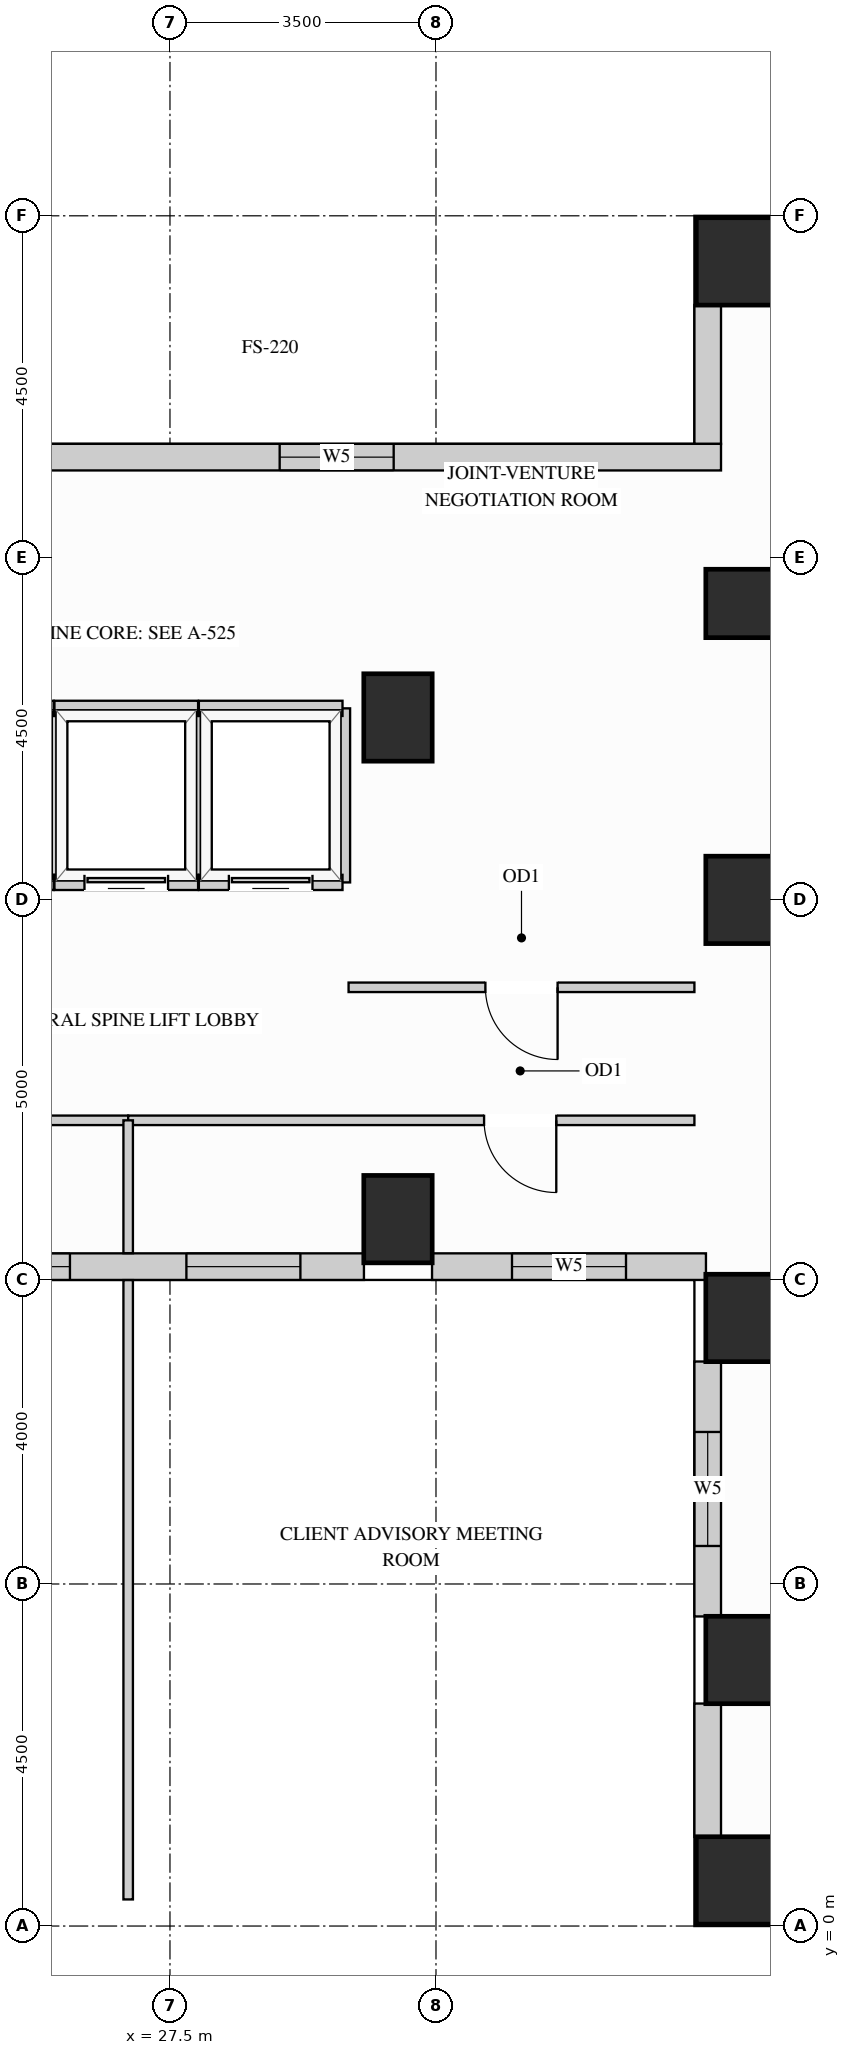
"""IFC4 building model, lengths in metres.
Left out: names, types, materials, properties, quantities, classifications, styles, units other than length and angle.
Written with IfcOpenShell. Run it as: python <this file> out.ifc"""

import sys

from ifc_helpers import new_model, si_unit, direction, frame, frame_2d, origin, origin_2d, place, context, subcontext, project, spatial, rectangle, extrude, source, transform, mapped, element, fill, save


model = new_model("IFC4")
c1 = context("Model", 3, precision=1e-05, world=origin(), true_north=direction((0.0, 1.0)))
c2 = subcontext(c1, "Body", "Model", "MODEL_VIEW")
j1 = project(units=[si_unit("LENGTHUNIT", "METRE"), si_unit("PLANEANGLEUNIT", "RADIAN")], contexts=[c1])
p1 = place(None, origin())
s1 = spatial("IfcSite", under=j1, at=p1, CompositionType="ELEMENT")
p2 = place(p1, origin())
s2 = spatial("IfcBuilding", under=s1, at=p2, CompositionType="ELEMENT")
p3 = place(p2, frame((0.0, 0.0, 99.0)))
s3 = spatial("IfcBuildingStorey", under=s2, at=p3, CompositionType="ELEMENT", Elevation=99.0)
m1 = source(origin(), c2, "Body", "SweptSolid", [
    extrude(rectangle(XDim=0.9, YDim=0.9, at=origin_2d()), origin(), (0.0, 0.0, 1.0), 3.38),
])
p4 = place(p3, frame((35.0, 17.4, 0.0), z_axis=(0.0, 0.0, 1.0), x_axis=(1.0, 0.0, 0.0)))
e1 = element("IfcColumn", 1, at=p4, inside=s3, PredefinedType="COLUMN", context=c2, shape_type="MappedRepresentation", body=[
    mapped(m1, transform((0.0, 0.0, 0.0), x_axis=(1.0, 0.0, 0.0), y_axis=(0.0, 1.0, 0.0), z_axis=(0.0, 0.0, 1.0))),
])
m2 = source(origin(), c2, "Body", "SweptSolid", [
    extrude(rectangle(XDim=0.9, YDim=1.15, at=origin_2d()), origin(), (0.0, 0.0, 1.0), 3.38),
])
for number, where, z_axis, x_axis in (
    (2, (35.0, 13.5, 0.0), (0.0, 0.0, 1.0), (1.0, 0.0, 0.0)),
    (3, (35.0, 3.5, 0.0), (0.0, 0.0, 1.0), (1.0, 0.0, 0.0)),
    (4, (35.0, 8.0, 0.0), (0.0, 0.0, 1.0), (1.0, 0.0, 0.0)),
    (5, (30.5, 15.9, 0.0), (0.0, 0.0, 1.0), (1.0, 0.0, 0.0)),
    (6, (30.5, 9.3, 0.0), (0.0, 0.0, 1.0), (1.0, 0.0, 0.0)),
):
    element("IfcColumn", number, at=place(p3, frame(where, z_axis=z_axis, x_axis=x_axis)), inside=s3, PredefinedType="COLUMN", context=c2, shape_type="MappedRepresentation", body=[
        mapped(m2, transform((0.0, 0.0, 0.0), x_axis=(1.0, 0.0, 0.0), y_axis=(0.0, 1.0, 0.0), z_axis=(0.0, 0.0, 1.0))),
    ])
m3 = source(origin(), c2, "Body", "SweptSolid", [
    extrude(rectangle(XDim=1.15, YDim=1.15, at=origin_2d()), origin(), (0.0, 0.0, 1.0), 3.38),
])
for number, where, z_axis, x_axis in (
    (7, (35.0, 21.9, 0.0), (0.0, 0.0, 1.0), (1.0, 0.0, 0.0)),
    (8, (35.0, 0.6, 0.0), (0.0, 0.0, 1.0), (1.0, 0.0, 0.0)),
):
    element("IfcColumn", number, at=place(p3, frame(where, z_axis=z_axis, x_axis=x_axis)), inside=s3, PredefinedType="COLUMN", context=c2, shape_type="MappedRepresentation", body=[
        mapped(m3, transform((0.0, 0.0, 0.0), x_axis=(1.0, 0.0, 0.0), y_axis=(0.0, 1.0, 0.0), z_axis=(0.0, 0.0, 1.0))),
    ])
p5 = place(p3, frame((23.848, 8.675, 0.0), z_axis=(0.0, 0.0, 1.0), x_axis=(1.0, 0.0, 0.0)))
e9 = element("IfcWall", 9, at=p5, inside=s3, PredefinedType="SOLIDWALL", context=c2, shape_type="SweptSolid", body=[
    extrude(rectangle(XDim=6.204, YDim=0.35, at=frame_2d((3.102, 0.0))), origin(), (0.0, 0.0, 1.0), 3.365),
])
p6 = place(p5, frame((0.836, 0.0, 0.78)))
e10 = element("IfcOpeningElement", 10, at=p6, cuts=e9, PredefinedType="OPENING", context=c2, shape_type="SweptSolid", body=[
    extrude(rectangle(XDim=1.5, YDim=2.0, at=frame_2d((0.75, 1.0))), frame((0.0, 0.185, 0.0), z_axis=(0.0, -1.0, 0.0), x_axis=(1.0, 0.0, 0.0)), (0.0, 0.0, 1.0), 0.37),
])
p7 = place(p5, frame((3.868, 0.0, 0.78)))
e11 = element("IfcOpeningElement", 11, at=p7, cuts=e9, PredefinedType="OPENING", context=c2, shape_type="SweptSolid", body=[
    extrude(rectangle(XDim=1.5, YDim=2.0, at=frame_2d((0.75, 1.0))), frame((0.0, 0.185, 0.0), z_axis=(0.0, -1.0, 0.0), x_axis=(1.0, 0.0, 0.0)), (0.0, 0.0, 1.0), 0.37),
])
p8 = place(p3, frame((30.948, 8.675, 0.0), z_axis=(0.0, 0.0, 1.0), x_axis=(1.0, 0.0, 0.0)))
e12 = element("IfcWall", 12, at=p8, inside=s3, PredefinedType="SOLIDWALL", context=c2, shape_type="SweptSolid", body=[
    extrude(rectangle(XDim=3.604, YDim=0.35, at=frame_2d((1.802, 0.0))), origin(), (0.0, 0.0, 1.0), 3.365),
])
p9 = place(p8, frame((1.052, 0.0, 0.78)))
e13 = element("IfcOpeningElement", 13, at=p9, cuts=e12, PredefinedType="OPENING", context=c2, shape_type="SweptSolid", body=[
    extrude(rectangle(XDim=1.5, YDim=2.0, at=frame_2d((0.75, 1.0))), frame((0.0, 0.185, 0.0), z_axis=(0.0, -1.0, 0.0), x_axis=(1.0, 0.0, 0.0)), (0.0, 0.0, 1.0), 0.37),
])
p10 = place(p3, frame((34.575, 7.427, 0.0), z_axis=(0.0, 0.0, 1.0), x_axis=(0.0, -1.0, 0.0)))
e14 = element("IfcWall", 14, at=p10, inside=s3, PredefinedType="SOLIDWALL", context=c2, shape_type="SweptSolid", body=[
    extrude(rectangle(XDim=3.354, YDim=0.35, at=frame_2d((1.677, 0.0))), origin(), (0.0, 0.0, 1.0), 3.365),
])
p11 = place(p10, frame((0.927, 0.0, 0.78)))
e15 = element("IfcOpeningElement", 15, at=p11, cuts=e14, PredefinedType="OPENING", context=c2, shape_type="SweptSolid", body=[
    extrude(rectangle(XDim=1.5, YDim=2.0, at=frame_2d((0.75, 1.0))), frame((0.0, 0.185, 0.0), z_axis=(0.0, -1.0, 0.0), x_axis=(1.0, 0.0, 0.0)), (0.0, 0.0, 1.0), 0.37),
])
m4 = source(origin(), c2, "Body", "SweptSolid", [
    extrude(rectangle(XDim=1.754, YDim=0.35, at=frame_2d((0.877, 0.0))), origin(), (0.0, 0.0, 1.0), 3.365),
])
p12 = place(p3, frame((34.575, 2.927, 0.0), z_axis=(0.0, 0.0, 1.0), x_axis=(0.0, -1.0, 0.0)))
e16 = element("IfcWall", 16, at=p12, inside=s3, PredefinedType="SOLIDWALL", context=c2, shape_type="MappedRepresentation", body=[
    mapped(m4, transform((0.0, 0.0, 0.0), x_axis=(1.0, 0.0, 0.0), y_axis=(0.0, 1.0, 0.0), z_axis=(0.0, 0.0, 1.0))),
])
m5 = source(origin(), c2, "Body", "SweptSolid", [
    extrude(rectangle(XDim=1.829, YDim=0.35, at=frame_2d((0.915, 0.0))), origin(), (0.0, 0.0, 1.0), 3.365),
])
p13 = place(p3, frame((34.575, 21.327, 0.0), z_axis=(0.0, 0.0, 1.0), x_axis=(0.0, -1.0, 0.0)))
e17 = element("IfcWall", 17, at=p13, inside=s3, PredefinedType="SOLIDWALL", context=c2, shape_type="MappedRepresentation", body=[
    mapped(m5, transform((0.0, 0.0, 0.0), x_axis=(1.0, 0.0, 0.0), y_axis=(0.0, 1.0, 0.0), z_axis=(0.0, 0.0, 1.0))),
])
p14 = place(p3, frame((34.75, 19.325, 0.0), z_axis=(0.0, 0.0, 1.0), x_axis=(-1.0, 0.0, 0.0)))
e18 = element("IfcWall", 18, at=p14, inside=s3, PredefinedType="SOLIDWALL", context=c2, shape_type="SweptSolid", body=[
    extrude(rectangle(XDim=15.6, YDim=0.35, at=frame_2d((7.8, 0.0))), origin(), (0.0, 0.0, 1.0), 3.365),
])
p15 = place(p14, frame((4.307, 0.0, 0.78)))
e19 = element("IfcOpeningElement", 19, at=p15, cuts=e18, PredefinedType="OPENING", context=c2, shape_type="SweptSolid", body=[
    extrude(rectangle(XDim=1.5, YDim=2.0, at=frame_2d((0.75, 1.0))), frame((0.0, 0.185, 0.0), z_axis=(0.0, -1.0, 0.0), x_axis=(1.0, 0.0, 0.0)), (0.0, 0.0, 1.0), 0.37),
])
p16 = place(p14, frame((9.793, 0.0, 0.78)))
e20 = element("IfcOpeningElement", 20, at=p16, cuts=e18, PredefinedType="OPENING", context=c2, shape_type="SweptSolid", body=[
    extrude(rectangle(XDim=1.5, YDim=2.0, at=frame_2d((0.75, 1.0))), frame((0.0, 0.185, 0.0), z_axis=(0.0, -1.0, 0.0), x_axis=(1.0, 0.0, 0.0)), (0.0, 0.0, 1.0), 0.37),
])
p17 = place(p3, frame((29.85, 12.35, 0.0), z_axis=(0.0, 0.0, 1.0), x_axis=(1.0, 0.0, 0.0)))
e21 = element("IfcWall", 21, at=p17, inside=s3, PredefinedType="PARTITIONING", context=c2, shape_type="SweptSolid", body=[
    extrude(rectangle(XDim=4.55, YDim=0.125, at=frame_2d((2.275, 0.0))), origin(), (0.0, 0.0, 1.0), 3.365),
])
p18 = place(p17, frame((1.8, 0.0, 0.0)))
e22 = element("IfcOpeningElement", 22, at=p18, cuts=e21, PredefinedType="OPENING", context=c2, shape_type="SweptSolid", body=[
    extrude(rectangle(XDim=0.95, YDim=2.15, at=frame_2d((0.475, 1.075))), frame((0.0, 0.073, 0.0), z_axis=(0.0, -1.0, 0.0), x_axis=(1.0, 0.0, 0.0)), (0.0, 0.0, 1.0), 0.145),
])
p19 = place(p3, frame((19.5, 10.6, 0.0), z_axis=(0.0, 0.0, 1.0), x_axis=(1.0, 0.0, 0.0)))
e23 = element("IfcWall", 23, at=p19, inside=s3, PredefinedType="PARTITIONING", context=c2, shape_type="SweptSolid", body=[
    extrude(rectangle(XDim=7.45, YDim=0.125, at=frame_2d((3.725, 0.0))), origin(), (0.0, 0.0, 1.0), 3.365),
])
p20 = place(p19, frame((1.817, 0.0, 0.0)))
e24 = element("IfcOpeningElement", 24, at=p20, cuts=e23, PredefinedType="OPENING", context=c2, shape_type="SweptSolid", body=[
    extrude(rectangle(XDim=0.95, YDim=2.15, at=frame_2d((0.475, 1.075))), frame((0.0, 0.073, 0.0), z_axis=(0.0, -1.0, 0.0), x_axis=(1.0, 0.0, 0.0)), (0.0, 0.0, 1.0), 0.145),
])
p21 = place(p3, frame((26.95, 10.6, 0.0), z_axis=(0.0, 0.0, 1.0), x_axis=(1.0, 0.0, 0.0)))
e25 = element("IfcWall", 25, at=p21, inside=s3, PredefinedType="PARTITIONING", context=c2, shape_type="SweptSolid", body=[
    extrude(rectangle(XDim=7.45, YDim=0.125, at=frame_2d((3.725, 0.0))), origin(), (0.0, 0.0, 1.0), 3.365),
])
p22 = place(p21, frame((4.683, 0.0, 0.0)))
e26 = element("IfcOpeningElement", 26, at=p22, cuts=e25, PredefinedType="OPENING", context=c2, shape_type="SweptSolid", body=[
    extrude(rectangle(XDim=0.95, YDim=2.15, at=frame_2d((0.475, 1.075))), frame((0.0, 0.073, 0.0), z_axis=(0.0, -1.0, 0.0), x_axis=(1.0, 0.0, 0.0)), (0.0, 0.0, 1.0), 0.145),
])
m6 = source(origin(), c2, "Body", "SweptSolid", [
    extrude(rectangle(XDim=8.148, YDim=0.125, at=frame_2d((4.074, 0.0))), origin(), (0.0, 0.0, 1.0), 3.365),
])
p23 = place(p3, frame((26.95, 0.35, 0.0), z_axis=(0.0, 0.0, 1.0), x_axis=(0.0, 1.0, 0.0)))
e27 = element("IfcWall", 27, at=p23, inside=s3, PredefinedType="PARTITIONING", context=c2, shape_type="MappedRepresentation", body=[
    mapped(m6, transform((0.0, 0.0, 0.0), x_axis=(1.0, 0.0, 0.0), y_axis=(0.0, 1.0, 0.0), z_axis=(0.0, 0.0, 1.0))),
])
m7 = source(origin(), c2, "Body", "SweptSolid", [
    extrude(rectangle(XDim=1.748, YDim=0.125, at=frame_2d((0.874, 0.0))), origin(), (0.0, 0.0, 1.0), 3.365),
])
p24 = place(p3, frame((26.95, 8.852, 0.0), z_axis=(0.0, 0.0, 1.0), x_axis=(0.0, 1.0, 0.0)))
e28 = element("IfcWall", 28, at=p24, inside=s3, PredefinedType="PARTITIONING", context=c2, shape_type="MappedRepresentation", body=[
    mapped(m7, transform((0.0, 0.0, 0.0), x_axis=(1.0, 0.0, 0.0), y_axis=(0.0, 1.0, 0.0), z_axis=(0.0, 0.0, 1.0))),
])
m8 = source(origin(), c2, "Body", "SweptSolid", [
    extrude(rectangle(XDim=2.29, YDim=0.2, at=frame_2d((1.145, 0.0))), origin(), (0.0, 0.0, 1.0), 3.365),
])
p25 = place(p3, frame((25.97, 13.73, 0.0), z_axis=(0.0, 0.0, 1.0), x_axis=(0.0, 1.0, 0.0)))
e29 = element("IfcWall", 29, at=p25, inside=s3, PredefinedType="PARTITIONING", context=c2, shape_type="MappedRepresentation", body=[
    mapped(m8, transform((0.0, 0.0, 0.0), x_axis=(1.0, 0.0, 0.0), y_axis=(0.0, 1.0, 0.0), z_axis=(0.0, 0.0, 1.0))),
])
m9 = source(origin(), c2, "Body", "SweptSolid", [
    extrude(rectangle(XDim=1.89, YDim=0.2, at=frame_2d((0.945, 0.0))), origin(), (0.0, 0.0, 1.0), 2.677),
])
p26 = place(p3, frame((24.08, 16.02, 0.0), z_axis=(0.0, 0.0, 1.0), x_axis=(1.0, 0.0, 0.0)))
e30 = element("IfcWall", 30, at=p26, inside=s3, PredefinedType="PARTITIONING", context=c2, shape_type="MappedRepresentation", body=[
    mapped(m9, transform((0.0, 0.0, 0.0), x_axis=(1.0, 0.0, 0.0), y_axis=(0.0, 1.0, 0.0), z_axis=(0.0, 0.0, 1.0))),
])
p27 = place(p3, frame((24.08, 13.73, 0.0), z_axis=(0.0, 0.0, 1.0), x_axis=(1.0, 0.0, 0.0)))
e31 = element("IfcWall", 31, at=p27, inside=s3, PredefinedType="PARTITIONING", context=c2, shape_type="SweptSolid", body=[
    extrude(rectangle(XDim=1.89, YDim=0.2, at=frame_2d((0.945, 0.0))), origin(), (0.0, 0.0, 1.0), 2.446),
])
p28 = place(p27, frame((0.395, 0.0, 0.0)))
e32 = element("IfcOpeningElement", 32, at=p28, cuts=e31, PredefinedType="OPENING", context=c2, shape_type="SweptSolid", body=[
    extrude(rectangle(XDim=1.1, YDim=2.2, at=frame_2d((0.55, 1.1))), frame((0.0, 0.11, 0.0), z_axis=(0.0, -1.0, 0.0), x_axis=(1.0, 0.0, 0.0)), (0.0, 0.0, 1.0), 0.22),
])
p29 = place(p3, frame((27.87, 13.73, 0.0), z_axis=(0.0, 0.0, 1.0), x_axis=(0.0, 1.0, 0.0)))
e33 = element("IfcWall", 33, at=p29, inside=s3, PredefinedType="PARTITIONING", context=c2, shape_type="MappedRepresentation", body=[
    mapped(m8, transform((0.0, 0.0, 0.0), x_axis=(1.0, 0.0, 0.0), y_axis=(0.0, 1.0, 0.0), z_axis=(0.0, 0.0, 1.0))),
])
m10 = source(origin(), c2, "Body", "SweptSolid", [
    extrude(rectangle(XDim=1.89, YDim=0.2, at=frame_2d((0.945, 0.0))), origin(), (0.0, 0.0, 1.0), 2.677),
])
p30 = place(p3, frame((25.98, 16.02, 0.0), z_axis=(0.0, 0.0, 1.0), x_axis=(1.0, 0.0, 0.0)))
e34 = element("IfcWall", 34, at=p30, inside=s3, PredefinedType="PARTITIONING", context=c2, shape_type="MappedRepresentation", body=[
    mapped(m10, transform((0.0, 0.0, 0.0), x_axis=(1.0, 0.0, 0.0), y_axis=(0.0, 1.0, 0.0), z_axis=(0.0, 0.0, 1.0))),
])
p31 = place(p3, frame((25.98, 13.73, 0.0), z_axis=(0.0, 0.0, 1.0), x_axis=(1.0, 0.0, 0.0)))
e35 = element("IfcWall", 35, at=p31, inside=s3, PredefinedType="PARTITIONING", context=c2, shape_type="SweptSolid", body=[
    extrude(rectangle(XDim=1.89, YDim=0.2, at=frame_2d((0.945, 0.0))), origin(), (0.0, 0.0, 1.0), 2.446),
])
p32 = place(p31, frame((0.395, 0.0, 0.0)))
e36 = element("IfcOpeningElement", 36, at=p32, cuts=e35, PredefinedType="OPENING", context=c2, shape_type="SweptSolid", body=[
    extrude(rectangle(XDim=1.1, YDim=2.2, at=frame_2d((0.55, 1.1))), frame((0.0, 0.11, 0.0), z_axis=(0.0, -1.0, 0.0), x_axis=(1.0, 0.0, 0.0)), (0.0, 0.0, 1.0), 0.22),
])
p33 = place(p3, frame((29.77, 13.73, 0.0), z_axis=(0.0, 0.0, 1.0), x_axis=(0.0, 1.0, 0.0)))
e37 = element("IfcWall", 37, at=p33, inside=s3, PredefinedType="PARTITIONING", context=c2, shape_type="MappedRepresentation", body=[
    mapped(m8, transform((0.0, 0.0, 0.0), x_axis=(1.0, 0.0, 0.0), y_axis=(0.0, 1.0, 0.0), z_axis=(0.0, 0.0, 1.0))),
])
p34 = place(p3, frame((27.88, 16.02, 0.0), z_axis=(0.0, 0.0, 1.0), x_axis=(1.0, 0.0, 0.0)))
e38 = element("IfcWall", 38, at=p34, inside=s3, PredefinedType="PARTITIONING", context=c2, shape_type="MappedRepresentation", body=[
    mapped(m10, transform((0.0, 0.0, 0.0), x_axis=(1.0, 0.0, 0.0), y_axis=(0.0, 1.0, 0.0), z_axis=(0.0, 0.0, 1.0))),
])
p35 = place(p3, frame((27.88, 13.73, 0.0), z_axis=(0.0, 0.0, 1.0), x_axis=(1.0, 0.0, 0.0)))
e39 = element("IfcWall", 39, at=p35, inside=s3, PredefinedType="PARTITIONING", context=c2, shape_type="SweptSolid", body=[
    extrude(rectangle(XDim=1.89, YDim=0.2, at=frame_2d((0.945, 0.0))), origin(), (0.0, 0.0, 1.0), 2.446),
])
p36 = place(p35, frame((0.395, 0.0, 0.0)))
e40 = element("IfcOpeningElement", 40, at=p36, cuts=e39, PredefinedType="OPENING", context=c2, shape_type="SweptSolid", body=[
    extrude(rectangle(XDim=1.1, YDim=2.2, at=frame_2d((0.55, 1.1))), frame((0.0, 0.11, 0.0), z_axis=(0.0, -1.0, 0.0), x_axis=(1.0, 0.0, 0.0)), (0.0, 0.0, 1.0), 0.22),
])
m11 = source(origin(), c2, "Body", "SweptSolid", [
    extrude(rectangle(XDim=1.1, YDim=2.2, at=frame_2d((0.55, 1.1))), frame((0.0, 0.025, 0.0), z_axis=(0.0, -1.0, 0.0), x_axis=(1.0, 0.0, 0.0)), (0.0, 0.0, 1.0), 0.05),
])
p37 = place(p32, origin())
e41 = element("IfcDoor", 41, at=p37, inside=s3, OperationType="SLIDING_TO_LEFT", PredefinedType="DOOR", context=c2, shape_type="MappedRepresentation", body=[
    mapped(m11, transform((0.0, 0.0, 0.0), x_axis=(1.0, 0.0, 0.0), y_axis=(0.0, 1.0, 0.0), z_axis=(0.0, 0.0, 1.0))),
])
fill(e36, e41)
p38 = place(p36, origin())
e42 = element("IfcDoor", 42, at=p38, inside=s3, OperationType="SLIDING_TO_LEFT", PredefinedType="DOOR", context=c2, shape_type="MappedRepresentation", body=[
    mapped(m11, transform((0.0, 0.0, 0.0), x_axis=(1.0, 0.0, 0.0), y_axis=(0.0, 1.0, 0.0), z_axis=(0.0, 0.0, 1.0))),
])
fill(e40, e42)
m12 = source(origin(), c2, "Body", "SweptSolid", [
    extrude(rectangle(XDim=0.95, YDim=2.15, at=frame_2d((0.475, 1.075))), frame((0.0, 0.025, 0.0), z_axis=(0.0, -1.0, 0.0), x_axis=(1.0, 0.0, 0.0)), (0.0, 0.0, 1.0), 0.05),
])
p39 = place(p18, origin())
e43 = element("IfcDoor", 43, at=p39, inside=s3, OperationType="SINGLE_SWING_RIGHT", PredefinedType="DOOR", context=c2, shape_type="MappedRepresentation", body=[
    mapped(m12, transform((0.0, 0.0, 0.0), x_axis=(1.0, 0.0, 0.0), y_axis=(0.0, 1.0, 0.0), z_axis=(0.0, 0.0, 1.0))),
])
fill(e22, e43)
p40 = place(p22, origin())
e44 = element("IfcDoor", 44, at=p40, inside=s3, OperationType="SINGLE_SWING_RIGHT", PredefinedType="DOOR", context=c2, shape_type="MappedRepresentation", body=[
    mapped(m12, transform((0.0, 0.0, 0.0), x_axis=(1.0, 0.0, 0.0), y_axis=(0.0, 1.0, 0.0), z_axis=(0.0, 0.0, 1.0))),
])
fill(e26, e44)
m13 = source(origin(), c2, "Body", "SweptSolid", [
    extrude(rectangle(XDim=1.5, YDim=2.0, at=frame_2d((0.75, 1.0))), frame((0.0, 0.03, 0.0), z_axis=(0.0, -1.0, 0.0), x_axis=(1.0, 0.0, 0.0)), (0.0, 0.0, 1.0), 0.06),
])
p41 = place(p6, origin())
e45 = element("IfcWindow", 45, at=p41, inside=s3, PartitioningType="SINGLE_PANEL", PredefinedType="WINDOW", context=c2, shape_type="MappedRepresentation", body=[
    mapped(m13, transform((0.0, 0.0, 0.0), x_axis=(1.0, 0.0, 0.0), y_axis=(0.0, 1.0, 0.0), z_axis=(0.0, 0.0, 1.0))),
])
fill(e10, e45)
p42 = place(p7, origin())
e46 = element("IfcWindow", 46, at=p42, inside=s3, PartitioningType="SINGLE_PANEL", PredefinedType="WINDOW", context=c2, shape_type="MappedRepresentation", body=[
    mapped(m13, transform((0.0, 0.0, 0.0), x_axis=(1.0, 0.0, 0.0), y_axis=(0.0, 1.0, 0.0), z_axis=(0.0, 0.0, 1.0))),
])
fill(e11, e46)
p43 = place(p9, origin())
e47 = element("IfcWindow", 47, at=p43, inside=s3, PartitioningType="SINGLE_PANEL", PredefinedType="WINDOW", context=c2, shape_type="MappedRepresentation", body=[
    mapped(m13, transform((0.0, 0.0, 0.0), x_axis=(1.0, 0.0, 0.0), y_axis=(0.0, 1.0, 0.0), z_axis=(0.0, 0.0, 1.0))),
])
fill(e13, e47)
p44 = place(p11, origin())
e48 = element("IfcWindow", 48, at=p44, inside=s3, PartitioningType="SINGLE_PANEL", PredefinedType="WINDOW", context=c2, shape_type="MappedRepresentation", body=[
    mapped(m13, transform((0.0, 0.0, 0.0), x_axis=(1.0, 0.0, 0.0), y_axis=(0.0, 1.0, 0.0), z_axis=(0.0, 0.0, 1.0))),
])
fill(e15, e48)
p45 = place(p15, origin())
e49 = element("IfcWindow", 49, at=p45, inside=s3, PartitioningType="SINGLE_PANEL", PredefinedType="WINDOW", context=c2, shape_type="MappedRepresentation", body=[
    mapped(m13, transform((0.0, 0.0, 0.0), x_axis=(1.0, 0.0, 0.0), y_axis=(0.0, 1.0, 0.0), z_axis=(0.0, 0.0, 1.0))),
])
fill(e19, e49)
save(model, sys.argv[1])
